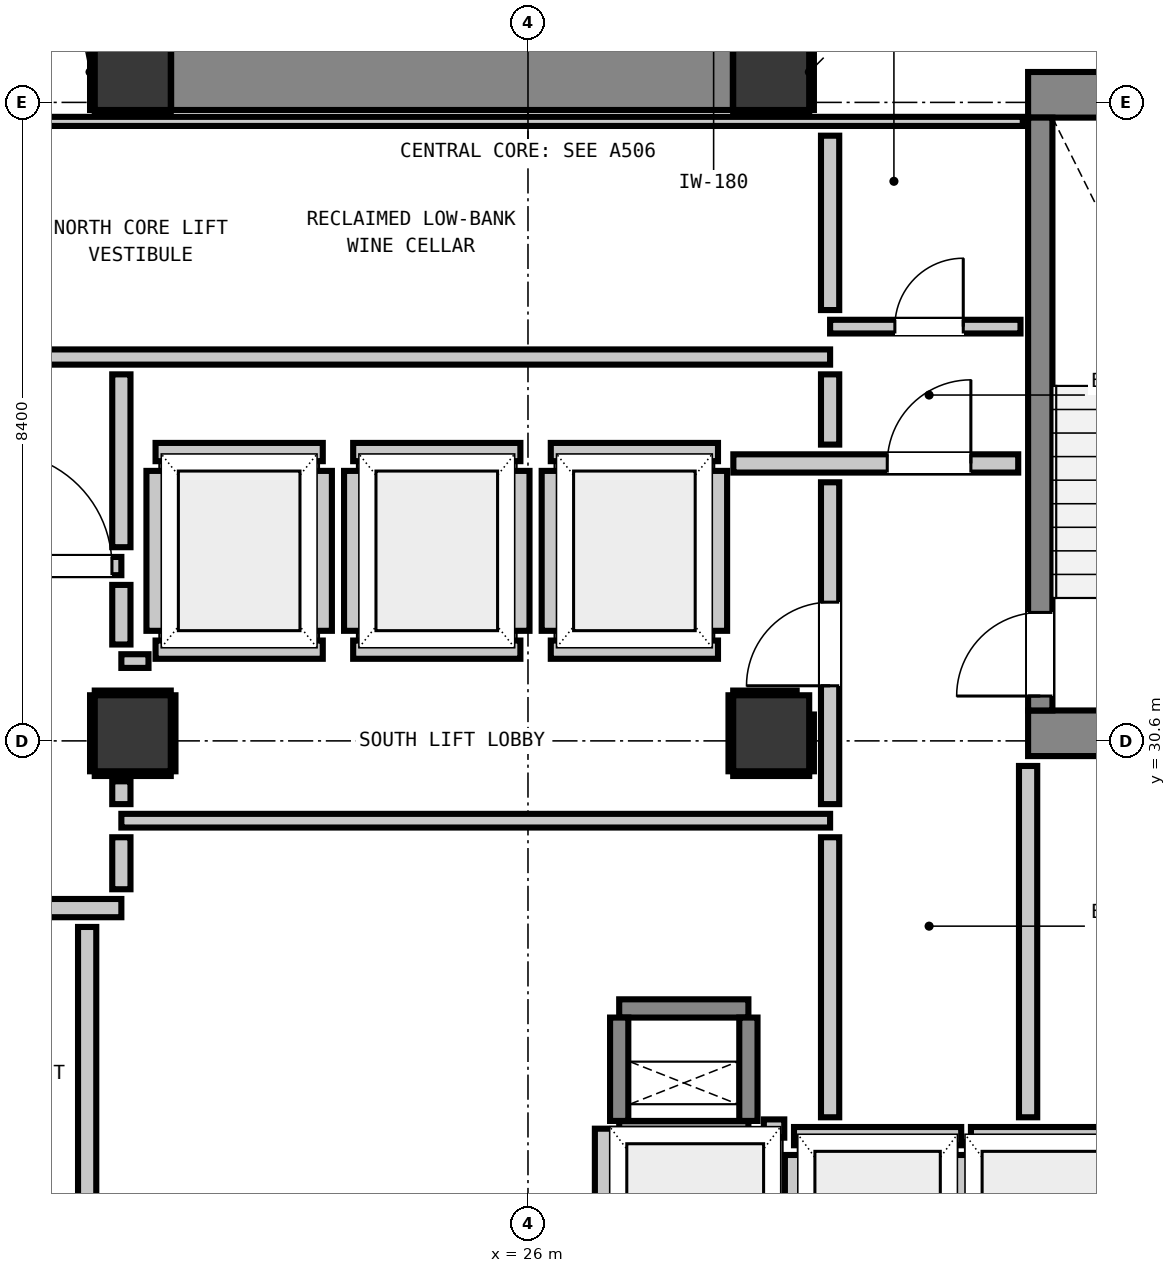
"""IFC4 building model, lengths in metres.
Left out: names, types, materials, properties, quantities, classifications, styles, units other than length and angle.
Written with IfcOpenShell. Run it as: python <this file> out.ifc"""

import sys

from ifc_helpers import new_model, si_unit, direction, frame, frame_2d, origin, origin_2d, place, context, subcontext, project, spatial, rectangle, extrude, element, fill, save


model = new_model("IFC4")
c1 = context("Model", 3, precision=1e-05, world=origin(), true_north=direction((0.0, 1.0)))
c2 = subcontext(c1, "Body", "Model", "MODEL_VIEW")
j1 = project(units=[si_unit("LENGTHUNIT", "METRE"), si_unit("PLANEANGLEUNIT", "RADIAN")], contexts=[c1])
p1 = place(None, origin())
s1 = spatial("IfcSite", under=j1, at=p1, CompositionType="ELEMENT")
p2 = place(p1, origin())
s2 = spatial("IfcBuilding", under=s1, at=p2, CompositionType="ELEMENT")
p3 = place(p2, frame((0.0, 0.0, 106.08)))
s3 = spatial("IfcBuildingStorey", under=s2, at=p3, CompositionType="ELEMENT", Elevation=106.08)
for number, where, z_axis, x_axis in (
    (1, (20.8, 39.4, 0.0), (0.0, 0.0, 1.0), (1.0, 0.0, 0.0)),
    (2, (29.2, 39.4, 0.0), (0.0, 0.0, 1.0), (1.0, 0.0, 0.0)),
):
    element("IfcColumn", number, at=place(p3, frame(where, z_axis=z_axis, x_axis=x_axis)), inside=s3, PredefinedType="COLUMN", context=c2, shape_type="SweptSolid", body=[
        extrude(rectangle(XDim=1.0, YDim=1.0, at=origin_2d()), origin(), (0.0, 0.0, 1.0), 3.32),
    ])
p4 = place(p3, frame((32.58, 39.1, 0.0), z_axis=(0.0, 0.0, 1.0), x_axis=(1.0, 0.0, 0.0)))
e3 = element("IfcWall", 3, at=p4, inside=s3, PredefinedType="SHEAR", context=c2, shape_type="SweptSolid", body=[
    extrude(rectangle(XDim=4.08, YDim=0.6, at=frame_2d((2.04, 0.0))), origin(), (0.0, 0.0, 1.0), 3.32),
])
p5 = place(p3, frame((32.58, 30.7, 0.0), z_axis=(0.0, 0.0, 1.0), x_axis=(1.0, 0.0, 0.0)))
e4 = element("IfcWall", 4, at=p5, inside=s3, PredefinedType="SHEAR", context=c2, shape_type="SweptSolid", body=[
    extrude(rectangle(XDim=3.415, YDim=0.6, at=frame_2d((1.708, 0.0))), origin(), (0.0, 0.0, 1.0), 3.32),
])
p6 = place(p3, frame((21.305, 39.4, 0.0), z_axis=(0.0, 0.0, 1.0), x_axis=(1.0, 0.0, 0.0)))
e5 = element("IfcWall", 5, at=p6, inside=s3, PredefinedType="SHEAR", context=c2, shape_type="SweptSolid", body=[
    extrude(rectangle(XDim=7.39, YDim=1.0, at=frame_2d((3.695, 0.0))), origin(), (0.0, 0.0, 1.0), 3.32),
])
p7 = place(p3, frame((32.74, 31.0, 0.0), z_axis=(0.0, 0.0, 1.0), x_axis=(0.0, 1.0, 0.0)))
e6 = element("IfcWall", 6, at=p7, inside=s3, PredefinedType="SHEAR", context=c2, shape_type="SweptSolid", body=[
    extrude(rectangle(XDim=7.8, YDim=0.32, at=frame_2d((3.9, 0.0))), origin(), (0.0, 0.0, 1.0), 3.32),
])
p8 = place(p7, frame((0.19, 0.0, 0.0)))
e7 = element("IfcOpeningElement", 7, at=p8, cuts=e6, PredefinedType="OPENING", context=c2, shape_type="SweptSolid", body=[
    extrude(rectangle(XDim=1.1, YDim=2.15, at=frame_2d((0.55, 1.075))), frame((0.0, 0.17, 0.0), z_axis=(0.0, -1.0, 0.0), x_axis=(1.0, 0.0, 0.0)), (0.0, 0.0, 1.0), 0.34),
])
for number, where, z_axis, x_axis in (
    (8, (27.2, 25.48, 0.0), (0.0, 0.0, 1.0), (1.0, 0.0, 0.0)),
    (9, (27.2, 27.08, 0.0), (0.0, 0.0, 1.0), (1.0, 0.0, 0.0)),
):
    element("IfcWall", number, at=place(p3, frame(where, z_axis=z_axis, x_axis=x_axis)), inside=s3, PredefinedType="SHEAR", context=c2, shape_type="SweptSolid", body=[
        extrude(rectangle(XDim=1.7, YDim=0.24, at=frame_2d((0.85, 0.0))), origin(), (0.0, 0.0, 1.0), 3.32),
    ])
for number, where, z_axis, x_axis in (
    (10, (27.2, 25.6, 0.0), (0.0, 0.0, 1.0), (0.0, 1.0, 0.0)),
    (11, (28.9, 25.6, 0.0), (0.0, 0.0, 1.0), (0.0, 1.0, 0.0)),
):
    element("IfcWall", number, at=place(p3, frame(where, z_axis=z_axis, x_axis=x_axis)), inside=s3, PredefinedType="SHEAR", context=c2, shape_type="SweptSolid", body=[
        extrude(rectangle(XDim=1.36, YDim=0.24, at=frame_2d((0.68, 0.0))), origin(), (0.0, 0.0, 1.0), 3.32),
    ])
for number, where, z_axis, x_axis in (
    (12, (20.8, 30.7, 0.0), (0.0, 0.0, 1.0), (1.0, 0.0, 0.0)),
    (13, (29.2, 30.7, 0.0), (0.0, 0.0, 1.0), (1.0, 0.0, 0.0)),
):
    element("IfcColumn", number, at=place(p3, frame(where, z_axis=z_axis, x_axis=x_axis)), inside=s3, PredefinedType="COLUMN", context=c2, shape_type="SweptSolid", body=[
        extrude(rectangle(XDim=1.0, YDim=1.0, at=origin_2d()), origin(), (0.0, 0.0, 1.0), 3.32),
    ])
for number, where, z_axis, x_axis in (
    (14, (21.1, 31.8, 0.0), (0.0, 0.0, 1.0), (1.0, 0.0, 0.0)),
    (15, (21.1, 34.4, 0.0), (0.0, 0.0, 1.0), (1.0, 0.0, 0.0)),
):
    element("IfcWall", number, at=place(p3, frame(where, z_axis=z_axis, x_axis=x_axis)), inside=s3, PredefinedType="PARTITIONING", context=c2, shape_type="SweptSolid", body=[
        extrude(rectangle(XDim=2.2, YDim=0.24, at=frame_2d((1.1, 0.0))), origin(), (0.0, 0.0, 1.0), 3.08),
    ])
p9 = place(p3, frame((21.1, 32.048, 0.0), z_axis=(0.0, 0.0, 1.0), x_axis=(0.0, 1.0, 0.0)))
e16 = element("IfcWall", 16, at=p9, inside=s3, PredefinedType="PARTITIONING", context=c2, shape_type="SweptSolid", body=[
    extrude(rectangle(XDim=2.104, YDim=0.24, at=frame_2d((1.052, 0.0))), origin(), (0.0, 0.0, 1.0), 2.315),
])
p10 = place(p3, frame((23.3, 32.048, 0.0), z_axis=(0.0, 0.0, 1.0), x_axis=(0.0, 1.0, 0.0)))
e17 = element("IfcWall", 17, at=p10, inside=s3, PredefinedType="PARTITIONING", context=c2, shape_type="SweptSolid", body=[
    extrude(rectangle(XDim=2.104, YDim=0.24, at=frame_2d((1.052, 0.0))), origin(), (0.0, 0.0, 1.0), 3.08),
])
for number, where, z_axis, x_axis in (
    (18, (23.7, 31.8, 0.0), (0.0, 0.0, 1.0), (1.0, 0.0, 0.0)),
    (19, (23.7, 34.4, 0.0), (0.0, 0.0, 1.0), (1.0, 0.0, 0.0)),
):
    element("IfcWall", number, at=place(p3, frame(where, z_axis=z_axis, x_axis=x_axis)), inside=s3, PredefinedType="PARTITIONING", context=c2, shape_type="SweptSolid", body=[
        extrude(rectangle(XDim=2.2, YDim=0.24, at=frame_2d((1.1, 0.0))), origin(), (0.0, 0.0, 1.0), 3.08),
    ])
for number, where, z_axis, x_axis in (
    (20, (23.7, 32.048, 0.0), (0.0, 0.0, 1.0), (0.0, 1.0, 0.0)),
    (21, (25.9, 32.048, 0.0), (0.0, 0.0, 1.0), (0.0, 1.0, 0.0)),
):
    element("IfcWall", number, at=place(p3, frame(where, z_axis=z_axis, x_axis=x_axis)), inside=s3, PredefinedType="PARTITIONING", context=c2, shape_type="SweptSolid", body=[
        extrude(rectangle(XDim=2.104, YDim=0.24, at=frame_2d((1.052, 0.0))), origin(), (0.0, 0.0, 1.0), 3.08),
    ])
for number, where, z_axis, x_axis in (
    (22, (26.3, 31.8, 0.0), (0.0, 0.0, 1.0), (1.0, 0.0, 0.0)),
    (23, (26.3, 34.4, 0.0), (0.0, 0.0, 1.0), (1.0, 0.0, 0.0)),
):
    element("IfcWall", number, at=place(p3, frame(where, z_axis=z_axis, x_axis=x_axis)), inside=s3, PredefinedType="PARTITIONING", context=c2, shape_type="SweptSolid", body=[
        extrude(rectangle(XDim=2.2, YDim=0.24, at=frame_2d((1.1, 0.0))), origin(), (0.0, 0.0, 1.0), 3.08),
    ])
for number, where, z_axis, x_axis in (
    (24, (26.3, 32.048, 0.0), (0.0, 0.0, 1.0), (0.0, 1.0, 0.0)),
    (25, (28.5, 32.048, 0.0), (0.0, 0.0, 1.0), (0.0, 1.0, 0.0)),
):
    element("IfcWall", number, at=place(p3, frame(where, z_axis=z_axis, x_axis=x_axis)), inside=s3, PredefinedType="PARTITIONING", context=c2, shape_type="SweptSolid", body=[
        extrude(rectangle(XDim=2.104, YDim=0.24, at=frame_2d((1.052, 0.0))), origin(), (0.0, 0.0, 1.0), 3.08),
    ])
p11 = place(p3, frame((29.5, 25.4, 0.0), z_axis=(0.0, 0.0, 1.0), x_axis=(1.0, 0.0, 0.0)))
e26 = element("IfcWall", 26, at=p11, inside=s3, PredefinedType="PARTITIONING", context=c2, shape_type="SweptSolid", body=[
    extrude(rectangle(XDim=2.2, YDim=0.24, at=frame_2d((1.1, 0.0))), origin(), (0.0, 0.0, 1.0), 3.08),
])
p12 = place(p3, frame((29.5, 22.632, 0.0), z_axis=(0.0, 0.0, 1.0), x_axis=(0.0, 1.0, 0.0)))
e27 = element("IfcWall", 27, at=p12, inside=s3, PredefinedType="PARTITIONING", context=c2, shape_type="SweptSolid", body=[
    extrude(rectangle(XDim=2.52, YDim=0.24, at=frame_2d((1.26, 0.0))), origin(), (0.0, 0.0, 1.0), 2.315),
])
p13 = place(p3, frame((31.7, 22.63, 0.0), z_axis=(0.0, 0.0, 1.0), x_axis=(0.0, 1.0, 0.0)))
e28 = element("IfcWall", 28, at=p13, inside=s3, PredefinedType="PARTITIONING", context=c2, shape_type="SweptSolid", body=[
    extrude(rectangle(XDim=2.522, YDim=0.24, at=frame_2d((1.261, 0.0))), origin(), (0.0, 0.0, 1.0), 3.08),
])
p14 = place(p3, frame((31.828, 25.4, 0.0), z_axis=(0.0, 0.0, 1.0), x_axis=(1.0, 0.0, 0.0)))
e29 = element("IfcWall", 29, at=p14, inside=s3, PredefinedType="PARTITIONING", context=c2, shape_type="SweptSolid", body=[
    extrude(rectangle(XDim=2.072, YDim=0.24, at=frame_2d((1.036, 0.0))), origin(), (0.0, 0.0, 1.0), 3.08),
])
p15 = place(p3, frame((29.103, 25.5, 0.0), z_axis=(0.0, 0.0, 1.0), x_axis=(1.0, 0.0, 0.0)))
e30 = element("IfcWall", 30, at=p15, inside=s3, PredefinedType="PARTITIONING", context=c2, shape_type="SweptSolid", body=[
    extrude(rectangle(XDim=0.269, YDim=0.24, at=frame_2d((0.135, 0.0))), origin(), (0.0, 0.0, 1.0), 3.08),
])
p16 = place(p3, frame((27.0, 22.63, 0.0), z_axis=(0.0, 0.0, 1.0), x_axis=(0.0, 1.0, 0.0)))
e31 = element("IfcWall", 31, at=p16, inside=s3, PredefinedType="PARTITIONING", context=c2, shape_type="SweptSolid", body=[
    extrude(rectangle(XDim=2.868, YDim=0.24, at=frame_2d((1.434, 0.0))), origin(), (0.0, 0.0, 1.0), 3.08),
])
p17 = place(p3, frame((17.45, 28.4, 0.0), z_axis=(0.0, 0.0, 1.0), x_axis=(1.0, 0.0, 0.0)))
e32 = element("IfcWall", 32, at=p17, inside=s3, PredefinedType="PARTITIONING", context=c2, shape_type="SweptSolid", body=[
    extrude(rectangle(XDim=3.2, YDim=0.24, at=frame_2d((1.6, 0.0))), origin(), (0.0, 0.0, 1.0), 3.08),
])
p18 = place(p17, frame((0.784, 0.0, 0.0)))
e33 = element("IfcOpeningElement", 33, at=p18, cuts=e32, PredefinedType="OPENING", context=c2, shape_type="SweptSolid", body=[
    extrude(rectangle(XDim=1.1, YDim=2.15, at=frame_2d((0.55, 1.075))), frame((0.0, 0.13, 0.0), z_axis=(0.0, -1.0, 0.0), x_axis=(1.0, 0.0, 0.0)), (0.0, 0.0, 1.0), 0.26),
])
p19 = place(p3, frame((17.45, 32.9, 0.0), z_axis=(0.0, 0.0, 1.0), x_axis=(1.0, 0.0, 0.0)))
e34 = element("IfcWall", 34, at=p19, inside=s3, PredefinedType="PARTITIONING", context=c2, shape_type="SweptSolid", body=[
    extrude(rectangle(XDim=3.2, YDim=0.24, at=frame_2d((1.6, 0.0))), origin(), (0.0, 0.0, 1.0), 3.08),
])
p20 = place(p19, frame((0.159, 0.0, 0.0)))
e35 = element("IfcOpeningElement", 35, at=p20, cuts=e34, PredefinedType="OPENING", context=c2, shape_type="SweptSolid", body=[
    extrude(rectangle(XDim=1.1, YDim=2.15, at=frame_2d((0.55, 1.075))), frame((0.0, 0.13, 0.0), z_axis=(0.0, -1.0, 0.0), x_axis=(1.0, 0.0, 0.0)), (0.0, 0.0, 1.0), 0.26),
])
p21 = place(p19, frame((1.576, 0.0, 0.0)))
e36 = element("IfcOpeningElement", 36, at=p21, cuts=e34, PredefinedType="OPENING", context=c2, shape_type="SweptSolid", body=[
    extrude(rectangle(XDim=1.5, YDim=2.15, at=frame_2d((0.75, 1.075))), frame((0.0, 0.13, 0.0), z_axis=(0.0, -1.0, 0.0), x_axis=(1.0, 0.0, 0.0)), (0.0, 0.0, 1.0), 0.26),
])
p22 = place(p3, frame((28.702, 34.25, 0.0), z_axis=(0.0, 0.0, 1.0), x_axis=(1.0, 0.0, 0.0)))
e37 = element("IfcWall", 37, at=p22, inside=s3, PredefinedType="PARTITIONING", context=c2, shape_type="SweptSolid", body=[
    extrude(rectangle(XDim=3.748, YDim=0.24, at=frame_2d((1.874, 0.0))), origin(), (0.0, 0.0, 1.0), 3.08),
])
p23 = place(p22, frame((2.025, 0.0, 0.0)))
e38 = element("IfcOpeningElement", 38, at=p23, cuts=e37, PredefinedType="OPENING", context=c2, shape_type="SweptSolid", body=[
    extrude(rectangle(XDim=1.1, YDim=2.15, at=frame_2d((0.55, 1.075))), frame((0.0, 0.13, 0.0), z_axis=(0.0, -1.0, 0.0), x_axis=(1.0, 0.0, 0.0)), (0.0, 0.0, 1.0), 0.26),
])
p24 = place(p3, frame((18.95, 35.65, 0.0), z_axis=(0.0, 0.0, 1.0), x_axis=(1.0, 0.0, 0.0)))
e39 = element("IfcWall", 39, at=p24, inside=s3, PredefinedType="PARTITIONING", context=c2, shape_type="SweptSolid", body=[
    extrude(rectangle(XDim=11.025, YDim=0.2, at=frame_2d((5.513, 0.0))), origin(), (0.0, 0.0, 1.0), 3.08),
])
p25 = place(p3, frame((20.65, 29.55, 0.0), z_axis=(0.0, 0.0, 1.0), x_axis=(1.0, 0.0, 0.0)))
e40 = element("IfcWall", 40, at=p25, inside=s3, PredefinedType="PARTITIONING", context=c2, shape_type="SweptSolid", body=[
    extrude(rectangle(XDim=9.325, YDim=0.18, at=frame_2d((4.663, 0.0))), origin(), (0.0, 0.0, 1.0), 3.08),
])
p26 = place(p3, frame((20.65, 31.65, 0.0), z_axis=(0.0, 0.0, 1.0), x_axis=(1.0, 0.0, 0.0)))
e41 = element("IfcWall", 41, at=p26, inside=s3, PredefinedType="PARTITIONING", context=c2, shape_type="SweptSolid", body=[
    extrude(rectangle(XDim=0.357, YDim=0.18, at=frame_2d((0.179, 0.0))), origin(), (0.0, 0.0, 1.0), 3.08),
])
p27 = place(p3, frame((29.975, 36.05, 0.0), z_axis=(0.0, 0.0, 1.0), x_axis=(1.0, 0.0, 0.0)))
e42 = element("IfcWall", 42, at=p27, inside=s3, PredefinedType="PARTITIONING", context=c2, shape_type="SweptSolid", body=[
    extrude(rectangle(XDim=2.505, YDim=0.18, at=frame_2d((1.252, 0.0))), origin(), (0.0, 0.0, 1.0), 3.08),
])
p28 = place(p27, frame((0.852, 0.0, 0.0)))
e43 = element("IfcOpeningElement", 43, at=p28, cuts=e42, PredefinedType="OPENING", context=c2, shape_type="SweptSolid", body=[
    extrude(rectangle(XDim=0.9, YDim=2.1, at=frame_2d((0.45, 1.05))), frame((0.0, 0.1, 0.0), z_axis=(0.0, -1.0, 0.0), x_axis=(1.0, 0.0, 0.0)), (0.0, 0.0, 1.0), 0.2),
])
p29 = place(p3, frame((18.95, 38.75, 0.0), z_axis=(0.0, 0.0, 1.0), x_axis=(1.0, 0.0, 0.0)))
e44 = element("IfcWall", 44, at=p29, inside=s3, PredefinedType="PARTITIONING", context=c2, shape_type="SweptSolid", body=[
    extrude(rectangle(XDim=13.56, YDim=0.12, at=frame_2d((6.78, 0.0))), origin(), (0.0, 0.0, 1.0), 3.08),
])
p30 = place(p3, frame((20.2, 22.586, 0.0), z_axis=(0.0, 0.0, 1.0), x_axis=(0.0, 1.0, 0.0)))
e45 = element("IfcWall", 45, at=p30, inside=s3, PredefinedType="PARTITIONING", context=c2, shape_type="SweptSolid", body=[
    extrude(rectangle(XDim=5.566, YDim=0.24, at=frame_2d((2.783, 0.0))), origin(), (0.0, 0.0, 1.0), 3.08),
])
p31 = place(p3, frame((20.65, 28.648, 0.0), z_axis=(0.0, 0.0, 1.0), x_axis=(0.0, 1.0, 0.0)))
e46 = element("IfcWall", 46, at=p31, inside=s3, PredefinedType="PARTITIONING", context=c2, shape_type="SweptSolid", body=[
    extrude(rectangle(XDim=0.684, YDim=0.24, at=frame_2d((0.342, 0.0))), origin(), (0.0, 0.0, 1.0), 2.315),
])
p32 = place(p3, frame((20.65, 29.768, 0.0), z_axis=(0.0, 0.0, 1.0), x_axis=(0.0, 1.0, 0.0)))
e47 = element("IfcWall", 47, at=p32, inside=s3, PredefinedType="PARTITIONING", context=c2, shape_type="SweptSolid", body=[
    extrude(rectangle(XDim=0.3, YDim=0.24, at=frame_2d((0.15, 0.0))), origin(), (0.0, 0.0, 1.0), 2.315),
])
p33 = place(p3, frame((20.65, 31.868, 0.0), z_axis=(0.0, 0.0, 1.0), x_axis=(0.0, 1.0, 0.0)))
e48 = element("IfcWall", 48, at=p33, inside=s3, PredefinedType="PARTITIONING", context=c2, shape_type="SweptSolid", body=[
    extrude(rectangle(XDim=0.784, YDim=0.24, at=frame_2d((0.392, 0.0))), origin(), (0.0, 0.0, 1.0), 2.315),
])
p34 = place(p3, frame((20.65, 33.148, 0.0), z_axis=(0.0, 0.0, 1.0), x_axis=(0.0, 1.0, 0.0)))
e49 = element("IfcWall", 49, at=p34, inside=s3, PredefinedType="PARTITIONING", context=c2, shape_type="SweptSolid", body=[
    extrude(rectangle(XDim=2.274, YDim=0.24, at=frame_2d((1.137, 0.0))), origin(), (0.0, 0.0, 1.0), 2.315),
])
p35 = place(p3, frame((29.975, 25.648, 0.0), z_axis=(0.0, 0.0, 1.0), x_axis=(0.0, 1.0, 0.0)))
e50 = element("IfcWall", 50, at=p35, inside=s3, PredefinedType="PARTITIONING", context=c2, shape_type="SweptSolid", body=[
    extrude(rectangle(XDim=3.684, YDim=0.24, at=frame_2d((1.842, 0.0))), origin(), (0.0, 0.0, 1.0), 3.08),
])
p36 = place(p3, frame((29.975, 29.768, 0.0), z_axis=(0.0, 0.0, 1.0), x_axis=(0.0, 1.0, 0.0)))
e51 = element("IfcWall", 51, at=p36, inside=s3, PredefinedType="PARTITIONING", context=c2, shape_type="SweptSolid", body=[
    extrude(rectangle(XDim=4.234, YDim=0.24, at=frame_2d((2.117, 0.0))), origin(), (0.0, 0.0, 1.0), 3.08),
])
p37 = place(p36, frame((1.557, 0.0, 0.0)))
e52 = element("IfcOpeningElement", 52, at=p37, cuts=e51, PredefinedType="OPENING", context=c2, shape_type="SweptSolid", body=[
    extrude(rectangle(XDim=1.1, YDim=2.15, at=frame_2d((0.55, 1.075))), frame((0.0, 0.13, 0.0), z_axis=(0.0, -1.0, 0.0), x_axis=(1.0, 0.0, 0.0)), (0.0, 0.0, 1.0), 0.26),
])
p38 = place(p3, frame((29.975, 34.498, 0.0), z_axis=(0.0, 0.0, 1.0), x_axis=(0.0, 1.0, 0.0)))
e53 = element("IfcWall", 53, at=p38, inside=s3, PredefinedType="PARTITIONING", context=c2, shape_type="SweptSolid", body=[
    extrude(rectangle(XDim=0.924, YDim=0.24, at=frame_2d((0.462, 0.0))), origin(), (0.0, 0.0, 1.0), 3.08),
])
p39 = place(p3, frame((29.975, 36.268, 0.0), z_axis=(0.0, 0.0, 1.0), x_axis=(0.0, 1.0, 0.0)))
e54 = element("IfcWall", 54, at=p39, inside=s3, PredefinedType="PARTITIONING", context=c2, shape_type="SweptSolid", body=[
    extrude(rectangle(XDim=2.294, YDim=0.24, at=frame_2d((1.147, 0.0))), origin(), (0.0, 0.0, 1.0), 3.08),
])
p40 = place(p3, frame((32.58, 25.648, 0.0), z_axis=(0.0, 0.0, 1.0), x_axis=(0.0, 1.0, 0.0)))
e55 = element("IfcWall", 55, at=p40, inside=s3, PredefinedType="PARTITIONING", context=c2, shape_type="SweptSolid", body=[
    extrude(rectangle(XDim=4.622, YDim=0.24, at=frame_2d((2.311, 0.0))), origin(), (0.0, 0.0, 1.0), 3.08),
])
for number, where, z_axis, x_axis in (
    (56, (20.3, 38.868, 0.0), (0.0, 0.0, 1.0), (1.0, 0.0, 0.0)),
    (57, (20.268, 38.9, 0.0), (0.0, 0.0, 1.0), (0.0, 1.0, 0.0)),
    (58, (28.7, 38.868, 0.0), (0.0, 0.0, 1.0), (1.0, 0.0, 0.0)),
    (59, (29.732, 38.9, 0.0), (0.0, 0.0, 1.0), (0.0, 1.0, 0.0)),
    (60, (20.3, 30.168, 0.0), (0.0, 0.0, 1.0), (1.0, 0.0, 0.0)),
    (61, (20.3, 31.232, 0.0), (0.0, 0.0, 1.0), (1.0, 0.0, 0.0)),
    (62, (20.268, 30.2, 0.0), (0.0, 0.0, 1.0), (0.0, 1.0, 0.0)),
    (63, (21.332, 30.2, 0.0), (0.0, 0.0, 1.0), (0.0, 1.0, 0.0)),
    (64, (28.7, 30.168, 0.0), (0.0, 0.0, 1.0), (1.0, 0.0, 0.0)),
):
    element("IfcWall", number, at=place(p3, frame(where, z_axis=z_axis, x_axis=x_axis)), inside=s3, PredefinedType="PARTITIONING", context=c2, shape_type="SweptSolid", body=[
        extrude(rectangle(XDim=1.0, YDim=0.06, at=frame_2d((0.5, 0.0))), origin(), (0.0, 0.0, 1.0), 1.45),
    ])
p41 = place(p3, frame((28.7, 31.232, 0.0), z_axis=(0.0, 0.0, 1.0), x_axis=(1.0, 0.0, 0.0)))
e65 = element("IfcWall", 65, at=p41, inside=s3, PredefinedType="PARTITIONING", context=c2, shape_type="SweptSolid", body=[
    extrude(rectangle(XDim=0.835, YDim=0.06, at=frame_2d((0.417, 0.0))), origin(), (0.0, 0.0, 1.0), 1.45),
])
p42 = place(p3, frame((28.668, 30.2, 0.0), z_axis=(0.0, 0.0, 1.0), x_axis=(0.0, 1.0, 0.0)))
e66 = element("IfcWall", 66, at=p42, inside=s3, PredefinedType="PARTITIONING", context=c2, shape_type="SweptSolid", body=[
    extrude(rectangle(XDim=1.0, YDim=0.06, at=frame_2d((0.5, 0.0))), origin(), (0.0, 0.0, 1.0), 1.45),
])
p43 = place(p3, frame((29.732, 30.2, 0.0), z_axis=(0.0, 0.0, 1.0), x_axis=(0.0, 1.0, 0.0)))
e67 = element("IfcWall", 67, at=p43, inside=s3, PredefinedType="PARTITIONING", context=c2, shape_type="SweptSolid", body=[
    extrude(rectangle(XDim=0.747, YDim=0.06, at=frame_2d((0.374, 0.0))), origin(), (0.0, 0.0, 1.0), 1.45),
])
p44 = place(p8, origin())
e68 = element("IfcDoor", 68, at=p44, inside=s3, OperationType="SINGLE_SWING_LEFT", PredefinedType="DOOR", context=c2, shape_type="SweptSolid", body=[
    extrude(rectangle(XDim=1.1, YDim=2.15, at=frame_2d((0.55, 1.075))), frame((0.0, 0.025, 0.0), z_axis=(0.0, -1.0, 0.0), x_axis=(1.0, 0.0, 0.0)), (0.0, 0.0, 1.0), 0.05),
])
fill(e7, e68)
p45 = place(p37, origin())
e69 = element("IfcDoor", 69, at=p45, inside=s3, OperationType="SINGLE_SWING_LEFT", PredefinedType="DOOR", context=c2, shape_type="SweptSolid", body=[
    extrude(rectangle(XDim=1.1, YDim=2.15, at=frame_2d((0.55, 1.075))), frame((0.0, 0.025, 0.0), z_axis=(0.0, -1.0, 0.0), x_axis=(1.0, 0.0, 0.0)), (0.0, 0.0, 1.0), 0.05),
])
fill(e52, e69)
p46 = place(p23, origin())
e70 = element("IfcDoor", 70, at=p46, inside=s3, OperationType="SINGLE_SWING_RIGHT", PredefinedType="DOOR", context=c2, shape_type="SweptSolid", body=[
    extrude(rectangle(XDim=1.1, YDim=2.15, at=frame_2d((0.55, 1.075))), frame((0.0, 0.025, 0.0), z_axis=(0.0, -1.0, 0.0), x_axis=(1.0, 0.0, 0.0)), (0.0, 0.0, 1.0), 0.05),
])
fill(e38, e70)
p47 = place(p21, origin())
e71 = element("IfcDoor", 71, at=p47, inside=s3, OperationType="SINGLE_SWING_LEFT", PredefinedType="DOOR", context=c2, shape_type="SweptSolid", body=[
    extrude(rectangle(XDim=1.5, YDim=2.15, at=frame_2d((0.75, 1.075))), frame((0.0, 0.025, 0.0), z_axis=(0.0, -1.0, 0.0), x_axis=(1.0, 0.0, 0.0)), (0.0, 0.0, 1.0), 0.05),
])
fill(e36, e71)
p48 = place(p28, origin())
e72 = element("IfcDoor", 72, at=p48, inside=s3, OperationType="SINGLE_SWING_RIGHT", PredefinedType="DOOR", context=c2, shape_type="SweptSolid", body=[
    extrude(rectangle(XDim=0.9, YDim=2.1, at=frame_2d((0.45, 1.05))), frame((0.0, 0.025, 0.0), z_axis=(0.0, -1.0, 0.0), x_axis=(1.0, 0.0, 0.0)), (0.0, 0.0, 1.0), 0.05),
])
fill(e43, e72)
save(model, sys.argv[1])
